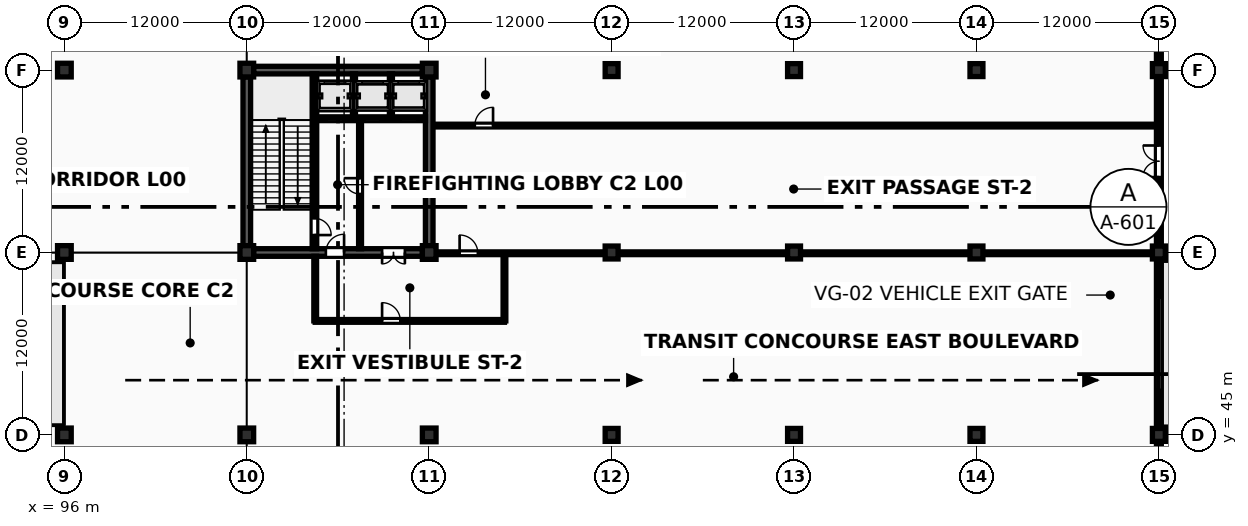
"""IFC4 building model, lengths in metres.
Left out: names, types, materials, properties, quantities, classifications, styles, units other than length and angle.
Written with IfcOpenShell. Run it as: python <this file> out.ifc"""

import sys

from ifc_helpers import new_model, si_unit, direction, frame, frame_2d, origin, origin_2d, place, context, subcontext, project, spatial, rectangle, extrude, element, fill, save


model = new_model("IFC4")
c1 = context("Model", 3, precision=1e-05, world=origin(), true_north=direction((0.0, 1.0)))
c2 = subcontext(c1, "Body", "Model", "MODEL_VIEW")
j1 = project(units=[si_unit("LENGTHUNIT", "METRE"), si_unit("PLANEANGLEUNIT", "RADIAN")], contexts=[c1])
p1 = place(None, origin())
s1 = spatial("IfcSite", under=j1, at=p1, CompositionType="ELEMENT")
p2 = place(p1, origin())
s2 = spatial("IfcBuilding", under=s1, at=p2, CompositionType="ELEMENT")
p3 = place(p2, origin())
s3 = spatial("IfcBuildingStorey", under=s2, at=p3, CompositionType="ELEMENT", Elevation=0.0)
for number, where, z_axis, x_axis in (
    (1, (96.0, 45.0, 0.0), (0.0, 0.0, 1.0), (1.0, 0.0, 0.0)),
    (2, (96.0, 57.0, 0.0), (0.0, 0.0, 1.0), (1.0, 0.0, 0.0)),
    (3, (96.0, 69.0, 0.0), (0.0, 0.0, 1.0), (1.0, 0.0, 0.0)),
    (4, (108.0, 45.0, 0.0), (0.0, 0.0, 1.0), (1.0, 0.0, 0.0)),
    (5, (108.0, 57.0, 0.0), (0.0, 0.0, 1.0), (1.0, 0.0, 0.0)),
    (6, (108.0, 69.0, 0.0), (0.0, 0.0, 1.0), (1.0, 0.0, 0.0)),
    (7, (120.0, 45.0, 0.0), (0.0, 0.0, 1.0), (1.0, 0.0, 0.0)),
    (8, (120.0, 57.0, 0.0), (0.0, 0.0, 1.0), (1.0, 0.0, 0.0)),
    (9, (120.0, 69.0, 0.0), (0.0, 0.0, 1.0), (1.0, 0.0, 0.0)),
):
    element("IfcColumn", number, at=place(p3, frame(where, z_axis=z_axis, x_axis=x_axis)), inside=s3, PredefinedType="COLUMN", context=c2, shape_type="SweptSolid", body=[
        extrude(rectangle(XDim=0.9, YDim=0.9, at=origin_2d()), origin(), (0.0, 0.0, 1.0), 5.4),
    ])
for number, where, z_axis, x_axis in (
    (10, (132.0, 45.0, 0.0), (0.0, 0.0, 1.0), (1.0, 0.0, 0.0)),
    (11, (132.0, 57.0, 0.0), (0.0, 0.0, 1.0), (1.0, 0.0, 0.0)),
    (12, (132.0, 69.0, 0.0), (0.0, 0.0, 1.0), (1.0, 0.0, 0.0)),
    (13, (144.0, 45.0, 0.0), (0.0, 0.0, 1.0), (1.0, 0.0, 0.0)),
    (14, (144.0, 57.0, 0.0), (0.0, 0.0, 1.0), (1.0, 0.0, 0.0)),
    (15, (144.0, 69.0, 0.0), (0.0, 0.0, 1.0), (1.0, 0.0, 0.0)),
    (16, (156.0, 45.0, 0.0), (0.0, 0.0, 1.0), (1.0, 0.0, 0.0)),
    (17, (156.0, 57.0, 0.0), (0.0, 0.0, 1.0), (1.0, 0.0, 0.0)),
    (18, (156.0, 69.0, 0.0), (0.0, 0.0, 1.0), (1.0, 0.0, 0.0)),
    (19, (168.0, 45.0, 0.0), (0.0, 0.0, 1.0), (1.0, 0.0, 0.0)),
    (20, (168.0, 57.0, 0.0), (0.0, 0.0, 1.0), (1.0, 0.0, 0.0)),
    (21, (168.0, 69.0, 0.0), (0.0, 0.0, 1.0), (1.0, 0.0, 0.0)),
):
    element("IfcColumn", number, at=place(p3, frame(where, z_axis=z_axis, x_axis=x_axis)), inside=s3, PredefinedType="COLUMN", context=c2, shape_type="SweptSolid", body=[
        extrude(rectangle(XDim=0.85, YDim=0.85, at=origin_2d()), origin(), (0.0, 0.0, 1.0), 5.4),
    ])
p4 = place(p3, frame((108.447, 57.0, 0.0), z_axis=(0.0, 0.0, 1.0), x_axis=(1.0, 0.0, 0.0)))
e22 = element("IfcWall", 22, at=p4, inside=s3, PredefinedType="SHEAR", context=c2, shape_type="SweptSolid", body=[
    extrude(rectangle(XDim=11.106, YDim=0.5, at=frame_2d((5.553, 0.0))), origin(), (0.0, 0.0, 1.0), 5.203),
])
p5 = place(p4, frame((4.753, 0.0, 0.0)))
e23 = element("IfcOpeningElement", 23, at=p5, cuts=e22, PredefinedType="OPENING", context=c2, shape_type="SweptSolid", body=[
    extrude(rectangle(XDim=1.2, YDim=2.2, at=frame_2d((0.6, 1.1))), frame((0.0, 0.265, 0.0), z_axis=(0.0, -1.0, 0.0), x_axis=(1.0, 0.0, 0.0)), (0.0, 0.0, 1.0), 0.53),
])
p6 = place(p4, frame((8.453, 0.0, 0.0)))
e24 = element("IfcOpeningElement", 24, at=p6, cuts=e22, PredefinedType="OPENING", context=c2, shape_type="SweptSolid", body=[
    extrude(rectangle(XDim=1.5, YDim=2.25, at=frame_2d((0.75, 1.125))), frame((0.0, 0.265, 0.0), z_axis=(0.0, -1.0, 0.0), x_axis=(1.0, 0.0, 0.0)), (0.0, 0.0, 1.0), 0.53),
])
for number, where, z_axis, x_axis in (
    (25, (108.447, 69.0, 0.0), (0.0, 0.0, 1.0), (1.0, 0.0, 0.0)),
    (26, (108.0, 57.447, 0.0), (0.0, 0.0, 1.0), (0.0, 1.0, 0.0)),
    (27, (120.0, 57.447, 0.0), (0.0, 0.0, 1.0), (0.0, 1.0, 0.0)),
):
    element("IfcWall", number, at=place(p3, frame(where, z_axis=z_axis, x_axis=x_axis)), inside=s3, PredefinedType="SHEAR", context=c2, shape_type="SweptSolid", body=[
        extrude(rectangle(XDim=11.106, YDim=0.5, at=frame_2d((5.553, 0.0))), origin(), (0.0, 0.0, 1.0), 5.203),
    ])
p7 = place(p3, frame((112.45, 57.247, 0.0), z_axis=(0.0, 0.0, 1.0), x_axis=(0.0, 1.0, 0.0)))
e28 = element("IfcWall", 28, at=p7, inside=s3, PredefinedType="SHEAR", context=c2, shape_type="SweptSolid", body=[
    extrude(rectangle(XDim=11.506, YDim=0.3, at=frame_2d((5.753, 0.0))), origin(), (0.0, 0.0, 1.0), 5.203),
])
p8 = place(p7, frame((0.9, 0.0, 0.0)))
e29 = element("IfcOpeningElement", 29, at=p8, cuts=e28, PredefinedType="OPENING", context=c2, shape_type="SweptSolid", body=[
    extrude(rectangle(XDim=1.1, YDim=2.2, at=frame_2d((0.55, 1.1))), frame((0.0, 0.165, 0.0), z_axis=(0.0, -1.0, 0.0), x_axis=(1.0, 0.0, 0.0)), (0.0, 0.0, 1.0), 0.33),
])
p9 = place(p3, frame((112.597, 65.8, 0.0), z_axis=(0.0, 0.0, 1.0), x_axis=(1.0, 0.0, 0.0)))
e30 = element("IfcWall", 30, at=p9, inside=s3, PredefinedType="SOLIDWALL", context=c2, shape_type="SweptSolid", body=[
    extrude(rectangle(XDim=7.156, YDim=0.25, at=frame_2d((3.578, 0.0))), origin(), (0.0, 0.0, 1.0), 5.203),
])
p10 = place(p9, frame((0.653, 0.0, 0.0)))
e31 = element("IfcOpeningElement", 31, at=p10, cuts=e30, PredefinedType="OPENING", context=c2, shape_type="SweptSolid", body=[
    extrude(rectangle(XDim=1.1, YDim=2.24, at=frame_2d((0.55, 1.12))), frame((0.0, 0.14, 0.0), z_axis=(0.0, -1.0, 0.0), x_axis=(1.0, 0.0, 0.0)), (0.0, 0.0, 1.0), 0.28),
])
p11 = place(p9, frame((3.153, 0.0, 0.0)))
e32 = element("IfcOpeningElement", 32, at=p11, cuts=e30, PredefinedType="OPENING", context=c2, shape_type="SweptSolid", body=[
    extrude(rectangle(XDim=1.05, YDim=2.2, at=frame_2d((0.525, 1.1))), frame((0.0, 0.14, 0.0), z_axis=(0.0, -1.0, 0.0), x_axis=(1.0, 0.0, 0.0)), (0.0, 0.0, 1.0), 0.28),
])
p12 = place(p9, frame((5.528, 0.0, 0.0)))
e33 = element("IfcOpeningElement", 33, at=p12, cuts=e30, PredefinedType="OPENING", context=c2, shape_type="SweptSolid", body=[
    extrude(rectangle(XDim=1.05, YDim=2.2, at=frame_2d((0.525, 1.1))), frame((0.0, 0.14, 0.0), z_axis=(0.0, -1.0, 0.0), x_axis=(1.0, 0.0, 0.0)), (0.0, 0.0, 1.0), 0.28),
])
for number, where, z_axis, x_axis in (
    (34, (115.05, 65.92, 0.0), (0.0, 0.0, 1.0), (0.0, 1.0, 0.0)),
    (35, (117.48, 65.92, 0.0), (0.0, 0.0, 1.0), (0.0, 1.0, 0.0)),
):
    element("IfcWall", number, at=place(p3, frame(where, z_axis=z_axis, x_axis=x_axis)), inside=s3, PredefinedType="SOLIDWALL", context=c2, shape_type="SweptSolid", body=[
        extrude(rectangle(XDim=2.83, YDim=0.2, at=frame_2d((1.415, 0.0))), origin(), (0.0, 0.0, 1.0), 5.193),
    ])
p13 = place(p3, frame((115.45, 57.25, 0.0), z_axis=(0.0, 0.0, 1.0), x_axis=(0.0, 1.0, 0.0)))
e36 = element("IfcWall", 36, at=p13, inside=s3, PredefinedType="SOLIDWALL", context=c2, shape_type="SweptSolid", body=[
    extrude(rectangle(XDim=8.43, YDim=0.19, at=frame_2d((4.215, 0.0))), origin(), (0.0, 0.0, 1.0), 5.193),
])
p14 = place(p13, frame((3.6, 0.0, 0.0)))
e37 = element("IfcOpeningElement", 37, at=p14, cuts=e36, PredefinedType="OPENING", context=c2, shape_type="SweptSolid", body=[
    extrude(rectangle(XDim=1.04, YDim=2.18, at=frame_2d((0.52, 1.09))), frame((0.0, 0.11, 0.0), z_axis=(0.0, -1.0, 0.0), x_axis=(1.0, 0.0, 0.0)), (0.0, 0.0, 1.0), 0.22),
])
p15 = place(p3, frame((168.0, 36.473, 0.0), z_axis=(0.0, 0.0, 1.0), x_axis=(0.0, 1.0, 0.0)))
e38 = element("IfcWall", 38, at=p15, inside=s3, PredefinedType="SOLIDWALL", context=c2, shape_type="SweptSolid", body=[
    extrude(rectangle(XDim=8.104, YDim=0.32, at=frame_2d((4.052, 0.0))), origin(), (0.0, 0.0, 1.0), 3.85),
])
p16 = place(p15, frame((2.972, 0.0, 0.55)))
e39 = element("IfcOpeningElement", 39, at=p16, cuts=e38, PredefinedType="OPENING", context=c2, shape_type="SweptSolid", body=[
    extrude(rectangle(XDim=2.16, YDim=1.42, at=frame_2d((1.08, 0.71))), frame((0.0, 0.175, 0.0), z_axis=(0.0, -1.0, 0.0), x_axis=(1.0, 0.0, 0.0)), (0.0, 0.0, 1.0), 0.35),
])
p17 = place(p3, frame((168.0, 45.423, 0.0), z_axis=(0.0, 0.0, 1.0), x_axis=(0.0, 1.0, 0.0)))
e40 = element("IfcWall", 40, at=p17, inside=s3, PredefinedType="SOLIDWALL", context=c2, shape_type="SweptSolid", body=[
    extrude(rectangle(XDim=11.154, YDim=0.32, at=frame_2d((5.577, 0.0))), origin(), (0.0, 0.0, 1.0), 3.85),
])
p18 = place(p17, frame((2.577, 0.0, 0.0)))
e41 = element("IfcOpeningElement", 41, at=p18, cuts=e40, PredefinedType="OPENING", context=c2, shape_type="SweptSolid", body=[
    extrude(rectangle(XDim=6.0, YDim=3.2, at=frame_2d((3.0, 1.6))), frame((0.0, 0.175, 0.0), z_axis=(0.0, -1.0, 0.0), x_axis=(1.0, 0.0, 0.0)), (0.0, 0.0, 1.0), 0.35),
])
p19 = place(p3, frame((168.0, 57.423, 0.0), z_axis=(0.0, 0.0, 1.0), x_axis=(0.0, 1.0, 0.0)))
e42 = element("IfcWall", 42, at=p19, inside=s3, PredefinedType="SOLIDWALL", context=c2, shape_type="SweptSolid", body=[
    extrude(rectangle(XDim=11.154, YDim=0.32, at=frame_2d((5.577, 0.0))), origin(), (0.0, 0.0, 1.0), 3.85),
])
p20 = place(p19, frame((4.537, 0.0, 0.0)))
e43 = element("IfcOpeningElement", 43, at=p20, cuts=e42, PredefinedType="OPENING", context=c2, shape_type="SweptSolid", body=[
    extrude(rectangle(XDim=2.08, YDim=2.44, at=frame_2d((1.04, 1.22))), frame((0.0, 0.175, 0.0), z_axis=(0.0, -1.0, 0.0), x_axis=(1.0, 0.0, 0.0)), (0.0, 0.0, 1.0), 0.35),
])
p21 = place(p3, frame((168.0, 69.423, 0.0), z_axis=(0.0, 0.0, 1.0), x_axis=(0.0, 1.0, 0.0)))
e44 = element("IfcWall", 44, at=p21, inside=s3, PredefinedType="SOLIDWALL", context=c2, shape_type="SweptSolid", body=[
    extrude(rectangle(XDim=8.104, YDim=0.32, at=frame_2d((4.052, 0.0))), origin(), (0.0, 0.0, 1.0), 3.85),
])
p22 = place(p21, frame((2.892, 0.0, 0.55)))
e45 = element("IfcOpeningElement", 45, at=p22, cuts=e44, PredefinedType="OPENING", context=c2, shape_type="SweptSolid", body=[
    extrude(rectangle(XDim=2.32, YDim=1.42, at=frame_2d((1.16, 0.71))), frame((0.0, 0.175, 0.0), z_axis=(0.0, -1.0, 0.0), x_axis=(1.0, 0.0, 0.0)), (0.0, 0.0, 1.0), 0.35),
])
p23 = place(p3, frame((112.5, 52.5, 0.0), z_axis=(0.0, 0.0, 1.0), x_axis=(0.0, 1.0, 0.0)))
e46 = element("IfcWall", 46, at=p23, inside=s3, PredefinedType="SOLIDWALL", context=c2, shape_type="SweptSolid", body=[
    extrude(rectangle(XDim=4.25, YDim=0.18, at=frame_2d((2.125, 0.0))), origin(), (0.0, 0.0, 1.0), 2.6),
])
p24 = place(p3, frame((112.5, 52.5, 0.0), z_axis=(0.0, 0.0, 1.0), x_axis=(1.0, 0.0, 0.0)))
e47 = element("IfcWall", 47, at=p24, inside=s3, PredefinedType="SOLIDWALL", context=c2, shape_type="SweptSolid", body=[
    extrude(rectangle(XDim=12.45, YDim=0.18, at=frame_2d((6.225, 0.0))), origin(), (0.0, 0.0, 1.0), 2.6),
])
p25 = place(p24, frame((4.4, 0.0, 0.0)))
e48 = element("IfcOpeningElement", 48, at=p25, cuts=e47, PredefinedType="OPENING", context=c2, shape_type="SweptSolid", body=[
    extrude(rectangle(XDim=1.2, YDim=2.2, at=frame_2d((0.6, 1.1))), frame((0.0, 0.105, 0.0), z_axis=(0.0, -1.0, 0.0), x_axis=(1.0, 0.0, 0.0)), (0.0, 0.0, 1.0), 0.21),
])
p26 = place(p3, frame((124.95, 52.5, 0.0), z_axis=(0.0, 0.0, 1.0), x_axis=(0.0, 1.0, 0.0)))
e49 = element("IfcWall", 49, at=p26, inside=s3, PredefinedType="SOLIDWALL", context=c2, shape_type="SweptSolid", body=[
    extrude(rectangle(XDim=4.45, YDim=0.18, at=frame_2d((2.225, 0.0))), origin(), (0.0, 0.0, 1.0), 2.6),
])
p27 = place(p3, frame((120.3, 56.95, 0.0), z_axis=(0.0, 0.0, 1.0), x_axis=(1.0, 0.0, 0.0)))
e50 = element("IfcWall", 50, at=p27, inside=s3, PredefinedType="SOLIDWALL", context=c2, shape_type="SweptSolid", body=[
    extrude(rectangle(XDim=47.3, YDim=0.18, at=frame_2d((23.65, 0.0))), origin(), (0.0, 0.0, 1.0), 2.6),
])
p28 = place(p27, frame((1.7, 0.0, 0.0)))
e51 = element("IfcOpeningElement", 51, at=p28, cuts=e50, PredefinedType="OPENING", context=c2, shape_type="SweptSolid", body=[
    extrude(rectangle(XDim=1.2, YDim=2.2, at=frame_2d((0.6, 1.1))), frame((0.0, 0.105, 0.0), z_axis=(0.0, -1.0, 0.0), x_axis=(1.0, 0.0, 0.0)), (0.0, 0.0, 1.0), 0.21),
])
p29 = place(p3, frame((120.3, 65.35, 0.0), z_axis=(0.0, 0.0, 1.0), x_axis=(1.0, 0.0, 0.0)))
e52 = element("IfcWall", 52, at=p29, inside=s3, PredefinedType="SOLIDWALL", context=c2, shape_type="SweptSolid", body=[
    extrude(rectangle(XDim=47.3, YDim=0.18, at=frame_2d((23.65, 0.0))), origin(), (0.0, 0.0, 1.0), 2.6),
])
p30 = place(p29, frame((2.7, 0.0, 0.0)))
e53 = element("IfcOpeningElement", 53, at=p30, cuts=e52, PredefinedType="OPENING", context=c2, shape_type="SweptSolid", body=[
    extrude(rectangle(XDim=1.2, YDim=2.2, at=frame_2d((0.6, 1.1))), frame((0.0, 0.105, 0.0), z_axis=(0.0, -1.0, 0.0), x_axis=(1.0, 0.0, 0.0)), (0.0, 0.0, 1.0), 0.21),
])
p31 = place(p18, origin())
e54 = element("IfcDoor", 54, at=p31, inside=s3, OperationType="DOUBLE_DOOR_SLIDING", PredefinedType="GATE", context=c2, shape_type="SweptSolid", body=[
    extrude(rectangle(XDim=6.0, YDim=3.2, at=frame_2d((3.0, 1.6))), frame((0.0, 0.025, 0.0), z_axis=(0.0, -1.0, 0.0), x_axis=(1.0, 0.0, 0.0)), (0.0, 0.0, 1.0), 0.05),
])
fill(e41, e54)
p32 = place(p20, frame((2.08, 0.0, 0.0), z_axis=(0.0, 0.0, 1.0), x_axis=(-1.0, 0.0, 0.0)))
e55 = element("IfcDoor", 55, at=p32, inside=s3, OperationType="DOUBLE_DOOR_SINGLE_SWING", PredefinedType="DOOR", context=c2, shape_type="SweptSolid", body=[
    extrude(rectangle(XDim=2.08, YDim=2.44, at=frame_2d((1.04, 1.22))), frame((0.0, 0.025, 0.0), z_axis=(0.0, -1.0, 0.0), x_axis=(1.0, 0.0, 0.0)), (0.0, 0.0, 1.0), 0.05),
])
fill(e43, e55)
p33 = place(p8, origin())
e56 = element("IfcDoor", 56, at=p33, inside=s3, OperationType="SINGLE_SWING_LEFT", PredefinedType="DOOR", context=c2, shape_type="SweptSolid", body=[
    extrude(rectangle(XDim=1.1, YDim=2.2, at=frame_2d((0.55, 1.1))), frame((0.0, 0.025, 0.0), z_axis=(0.0, -1.0, 0.0), x_axis=(1.0, 0.0, 0.0)), (0.0, 0.0, 1.0), 0.05),
])
fill(e29, e56)
p34 = place(p14, origin())
e57 = element("IfcDoor", 57, at=p34, inside=s3, OperationType="SINGLE_SWING_RIGHT", PredefinedType="DOOR", context=c2, shape_type="SweptSolid", body=[
    extrude(rectangle(XDim=1.04, YDim=2.18, at=frame_2d((0.52, 1.09))), frame((0.0, 0.025, 0.0), z_axis=(0.0, -1.0, 0.0), x_axis=(1.0, 0.0, 0.0)), (0.0, 0.0, 1.0), 0.05),
])
fill(e37, e57)
p35 = place(p5, frame((1.2, 0.0, 0.0), z_axis=(0.0, 0.0, 1.0), x_axis=(-1.0, 0.0, 0.0)))
e58 = element("IfcDoor", 58, at=p35, inside=s3, OperationType="SINGLE_SWING_RIGHT", PredefinedType="DOOR", context=c2, shape_type="SweptSolid", body=[
    extrude(rectangle(XDim=1.2, YDim=2.2, at=frame_2d((0.6, 1.1))), frame((0.0, 0.025, 0.0), z_axis=(0.0, -1.0, 0.0), x_axis=(1.0, 0.0, 0.0)), (0.0, 0.0, 1.0), 0.05),
])
fill(e23, e58)
p36 = place(p6, origin())
e59 = element("IfcDoor", 59, at=p36, inside=s3, OperationType="DOUBLE_DOOR_SINGLE_SWING", PredefinedType="DOOR", context=c2, shape_type="SweptSolid", body=[
    extrude(rectangle(XDim=1.5, YDim=2.25, at=frame_2d((0.75, 1.125))), frame((0.0, 0.025, 0.0), z_axis=(0.0, -1.0, 0.0), x_axis=(1.0, 0.0, 0.0)), (0.0, 0.0, 1.0), 0.05),
])
fill(e24, e59)
p37 = place(p10, origin())
e60 = element("IfcDoor", 60, at=p37, inside=s3, OperationType="SLIDING_TO_LEFT", PredefinedType="USERDEFINED", context=c2, shape_type="SweptSolid", body=[
    extrude(rectangle(XDim=1.1, YDim=2.24, at=frame_2d((0.55, 1.12))), frame((0.0, 0.025, 0.0), z_axis=(0.0, -1.0, 0.0), x_axis=(1.0, 0.0, 0.0)), (0.0, 0.0, 1.0), 0.05),
])
fill(e31, e60)
p38 = place(p11, origin())
e61 = element("IfcDoor", 61, at=p38, inside=s3, OperationType="SLIDING_TO_LEFT", PredefinedType="USERDEFINED", context=c2, shape_type="SweptSolid", body=[
    extrude(rectangle(XDim=1.05, YDim=2.2, at=frame_2d((0.525, 1.1))), frame((0.0, 0.025, 0.0), z_axis=(0.0, -1.0, 0.0), x_axis=(1.0, 0.0, 0.0)), (0.0, 0.0, 1.0), 0.05),
])
fill(e32, e61)
p39 = place(p12, origin())
e62 = element("IfcDoor", 62, at=p39, inside=s3, OperationType="SLIDING_TO_LEFT", PredefinedType="USERDEFINED", context=c2, shape_type="SweptSolid", body=[
    extrude(rectangle(XDim=1.05, YDim=2.2, at=frame_2d((0.525, 1.1))), frame((0.0, 0.025, 0.0), z_axis=(0.0, -1.0, 0.0), x_axis=(1.0, 0.0, 0.0)), (0.0, 0.0, 1.0), 0.05),
])
fill(e33, e62)
p40 = place(p25, origin())
e63 = element("IfcDoor", 63, at=p40, inside=s3, OperationType="SINGLE_SWING_LEFT", PredefinedType="DOOR", context=c2, shape_type="SweptSolid", body=[
    extrude(rectangle(XDim=1.2, YDim=2.2, at=frame_2d((0.6, 1.1))), frame((0.0, 0.025, 0.0), z_axis=(0.0, -1.0, 0.0), x_axis=(1.0, 0.0, 0.0)), (0.0, 0.0, 1.0), 0.05),
])
fill(e48, e63)
p41 = place(p28, origin())
e64 = element("IfcDoor", 64, at=p41, inside=s3, OperationType="SINGLE_SWING_LEFT", PredefinedType="DOOR", context=c2, shape_type="SweptSolid", body=[
    extrude(rectangle(XDim=1.2, YDim=2.2, at=frame_2d((0.6, 1.1))), frame((0.0, 0.025, 0.0), z_axis=(0.0, -1.0, 0.0), x_axis=(1.0, 0.0, 0.0)), (0.0, 0.0, 1.0), 0.05),
])
fill(e51, e64)
p42 = place(p30, frame((1.2, 0.0, 0.0), z_axis=(0.0, 0.0, 1.0), x_axis=(-1.0, 0.0, 0.0)))
e65 = element("IfcDoor", 65, at=p42, inside=s3, OperationType="SINGLE_SWING_RIGHT", PredefinedType="DOOR", context=c2, shape_type="SweptSolid", body=[
    extrude(rectangle(XDim=1.2, YDim=2.2, at=frame_2d((0.6, 1.1))), frame((0.0, 0.025, 0.0), z_axis=(0.0, -1.0, 0.0), x_axis=(1.0, 0.0, 0.0)), (0.0, 0.0, 1.0), 0.05),
])
fill(e53, e65)
save(model, sys.argv[1])
